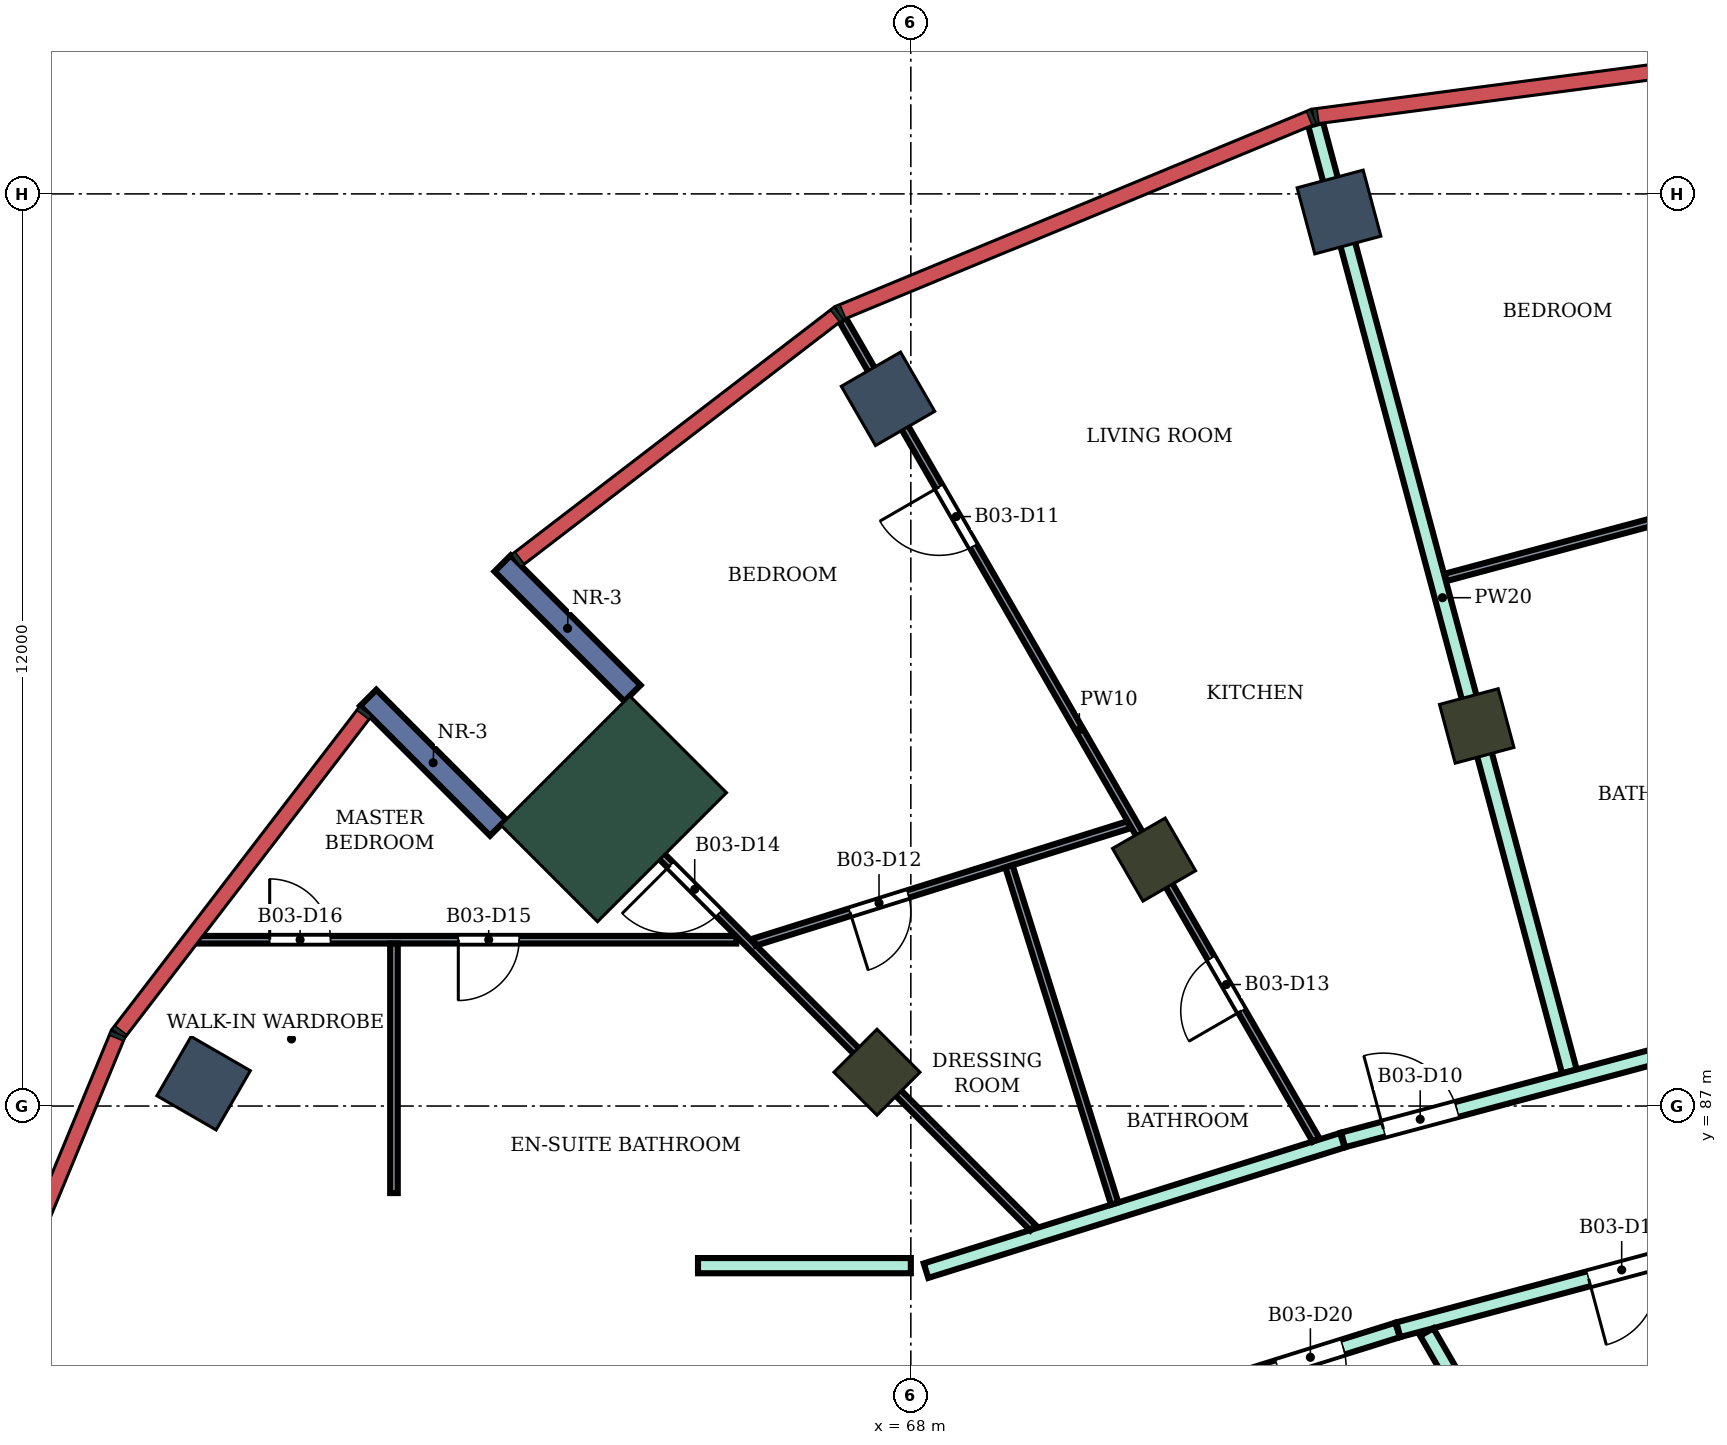
"""IFC4 building model, lengths in metres.
Left out: names, types, materials, properties, quantities, classifications, styles, units other than length and angle.
Written with IfcOpenShell. Run it as: python <this file> out.ifc"""

import sys

from ifc_helpers import new_model, si_unit, direction, frame, frame_2d, origin, origin_2d, place, context, subcontext, project, spatial, rectangle, extrude, element, fill, save


model = new_model("IFC4")
c1 = context("Model", 3, precision=1e-05, world=origin(), true_north=direction((0.0, 1.0)))
c2 = subcontext(c1, "Body", "Model", "MODEL_VIEW")
j1 = project(units=[si_unit("LENGTHUNIT", "METRE"), si_unit("PLANEANGLEUNIT", "RADIAN")], contexts=[c1])
p1 = place(None, origin())
s1 = spatial("IfcSite", under=j1, at=p1, CompositionType="ELEMENT")
p2 = place(p1, origin())
s2 = spatial("IfcBuilding", under=s1, at=p2, CompositionType="ELEMENT")
p3 = place(p2, frame((0.0, 0.0, 245.7)))
s3 = spatial("IfcBuildingStorey", under=s2, at=p3, CompositionType="ELEMENT", Elevation=245.7)
for number, where, z_axis, x_axis in (
    (1, (73.633, 98.762, 0.0), (0.0, 0.0, 1.0), (-0.259, 0.966, 0.0)),
    (2, (67.7, 96.304, 0.0), (0.0, 0.0, 1.0), (-0.5, 0.866, 0.0)),
    (3, (58.696, 87.3, 0.0), (0.0, 0.0, 1.0), (-0.866, 0.5, 0.0)),
):
    element("IfcColumn", number, at=place(p3, frame(where, z_axis=z_axis, x_axis=x_axis)), inside=s3, PredefinedType="COLUMN", context=c2, shape_type="SweptSolid", body=[
        extrude(rectangle(XDim=0.9, YDim=0.9, at=origin_2d()), origin(), (0.0, 0.0, 1.0), 4.2),
    ])
for number, where, z_axis, x_axis in (
    (4, (75.445, 92.0, 0.0), (0.0, 0.0, 1.0), (-0.259, 0.966, 0.0)),
    (5, (71.2, 90.242, 0.0), (0.0, 0.0, 1.0), (-0.5, 0.866, 0.0)),
    (6, (67.555, 87.445, 0.0), (0.0, 0.0, 1.0), (-0.707, 0.707, 0.0)),
):
    element("IfcColumn", number, at=place(p3, frame(where, z_axis=z_axis, x_axis=x_axis)), inside=s3, PredefinedType="COLUMN", context=c2, shape_type="SweptSolid", body=[
        extrude(rectangle(XDim=0.8, YDim=0.8, at=origin_2d()), origin(), (0.0, 0.0, 1.0), 4.2),
    ])
p4 = place(p3, frame((64.09, 90.91, 0.0), z_axis=(0.0, 0.0, 1.0), x_axis=(-0.707106781187, 0.707106781187, 0.0)))
e7 = element("IfcColumn", 7, at=p4, inside=s3, PredefinedType="COLUMN", context=c2, shape_type="SweptSolid", body=[
    extrude(rectangle(XDim=1.8, YDim=2.4, at=origin_2d()), origin(), (0.0, 0.0, 1.0), 4.2),
])
for number, where, z_axis, x_axis in (
    (8, (64.338, 92.43, 0.0), (0.0, 0.0, 1.0), (-0.707, 0.707, 0.0)),
    (9, (62.57, 90.662, 0.0), (0.0, 0.0, 1.0), (-0.707, 0.707, 0.0)),
):
    element("IfcWall", number, at=place(p3, frame(where, z_axis=z_axis, x_axis=x_axis)), inside=s3, PredefinedType="NOTDEFINED", context=c2, shape_type="SweptSolid", body=[
        extrude(rectangle(XDim=2.416, YDim=0.3, at=frame_2d((1.208, 0.0))), origin(), (0.0, 0.0, 1.0), 4.2),
    ])
p5 = place(p3, frame((65.2, 84.9, 0.0), z_axis=(0.0, 0.0, 1.0), x_axis=(1.0, 0.0, 0.0)))
e10 = element("IfcWall", 10, at=p5, inside=s3, PredefinedType="PARTITIONING", context=c2, shape_type="SweptSolid", body=[
    extrude(rectangle(XDim=2.8, YDim=0.2, at=frame_2d((1.4, 0.0))), origin(), (0.0, 0.0, 1.0), 3.75),
])
p6 = place(p3, frame((68.2, 84.834, 0.0), z_axis=(0.0, 0.0, 1.0), x_axis=(0.954272398161, 0.298938438661, 0.0)))
e11 = element("IfcWall", 11, at=p6, inside=s3, PredefinedType="PARTITIONING", context=c2, shape_type="SweptSolid", body=[
    extrude(rectangle(XDim=5.74, YDim=0.2, at=frame_2d((2.87, 0.0))), origin(), (0.0, 0.0, 1.0), 3.75),
])
p7 = place(p3, frame((72.1, 83.332, 0.0), z_axis=(0.0, 0.0, 1.0), x_axis=(0.954233106619, 0.299063836383, 0.0)))
e12 = element("IfcWall", 12, at=p7, inside=s3, PredefinedType="PARTITIONING", context=c2, shape_type="SweptSolid", body=[
    extrude(rectangle(XDim=2.414, YDim=0.2, at=frame_2d((1.207, 0.0))), origin(), (0.0, 0.0, 1.0), 3.75),
])
p8 = place(p7, frame((0.762, 0.0, 0.0)))
e13 = element("IfcOpeningElement", 13, at=p8, cuts=e12, PredefinedType="OPENING", context=c2, shape_type="SweptSolid", body=[
    extrude(rectangle(XDim=0.9, YDim=2.1, at=frame_2d((0.45, 1.05))), frame((0.0, 0.11, 0.0), z_axis=(0.0, -1.0, 0.0), x_axis=(1.0, 0.0, 0.0)), (0.0, 0.0, 1.0), 0.22),
])
p9 = place(p3, frame((73.325, 99.92, 0.0), z_axis=(0.0, 0.0, 1.0), x_axis=(0.258745857482, -0.965945433881, 0.0)))
e14 = element("IfcWall", 14, at=p9, inside=s3, PredefinedType="PARTITIONING", context=c2, shape_type="SweptSolid", body=[
    extrude(rectangle(XDim=12.904, YDim=0.2, at=frame_2d((6.452, 0.0))), origin(), (0.0, 0.0, 1.0), 3.75),
])
p10 = place(p3, frame((73.687, 86.554, 0.0), z_axis=(0.0, 0.0, 1.0), x_axis=(0.96595928904, 0.258694128106, 0.0)))
e15 = element("IfcWall", 15, at=p10, inside=s3, PredefinedType="PARTITIONING", context=c2, shape_type="SweptSolid", body=[
    extrude(rectangle(XDim=6.496, YDim=0.2, at=frame_2d((3.248, 0.0))), origin(), (0.0, 0.0, 1.0), 3.75),
])
p11 = place(p10, frame((0.55, 0.0, 0.0)))
e16 = element("IfcOpeningElement", 16, at=p11, cuts=e15, PredefinedType="OPENING", context=c2, shape_type="SweptSolid", body=[
    extrude(rectangle(XDim=1.0, YDim=2.1, at=frame_2d((0.5, 1.05))), frame((0.0, 0.11, 0.0), z_axis=(0.0, -1.0, 0.0), x_axis=(1.0, 0.0, 0.0)), (0.0, 0.0, 1.0), 0.22),
])
p12 = place(p3, frame((74.413, 84.057, 0.0), z_axis=(0.0, 0.0, 1.0), x_axis=(0.965972135939, 0.258646153246, 0.0)))
e17 = element("IfcWall", 17, at=p12, inside=s3, PredefinedType="PARTITIONING", context=c2, shape_type="SweptSolid", body=[
    extrude(rectangle(XDim=5.654, YDim=0.2, at=frame_2d((2.827, 0.0))), origin(), (0.0, 0.0, 1.0), 3.75),
])
p13 = place(p12, frame((2.593, 0.0, 0.0)))
e18 = element("IfcOpeningElement", 18, at=p13, cuts=e17, PredefinedType="OPENING", context=c2, shape_type="SweptSolid", body=[
    extrude(rectangle(XDim=0.9, YDim=2.1, at=frame_2d((0.45, 1.05))), frame((0.0, 0.11, 0.0), z_axis=(0.0, -1.0, 0.0), x_axis=(1.0, 0.0, 0.0)), (0.0, 0.0, 1.0), 0.22),
])
p14 = place(p3, frame((74.787, 84.027, 0.0), z_axis=(0.0, 0.0, 1.0), x_axis=(0.500079107518, -0.86597972622, 0.0)))
e19 = element("IfcWall", 19, at=p14, inside=s3, PredefinedType="PARTITIONING", context=c2, shape_type="SweptSolid", body=[
    extrude(rectangle(XDim=2.726, YDim=0.2, at=frame_2d((1.363, 0.0))), origin(), (0.0, 0.0, 1.0), 3.75),
])
p15 = place(p3, frame((58.6, 89.188, 0.0), z_axis=(0.0, 0.0, 1.0), x_axis=(1.0, 0.0, 0.0)))
e20 = element("IfcWall", 20, at=p15, inside=s3, PredefinedType="PARTITIONING", context=c2, shape_type="SweptSolid", body=[
    extrude(rectangle(XDim=7.103, YDim=0.1, at=frame_2d((3.551, 0.0))), origin(), (0.0, 0.0, 1.0), 3.75),
])
p16 = place(p15, frame((3.447, 0.0, 0.0)))
e21 = element("IfcOpeningElement", 21, at=p16, cuts=e20, PredefinedType="OPENING", context=c2, shape_type="SweptSolid", body=[
    extrude(rectangle(XDim=0.8, YDim=2.1, at=frame_2d((0.4, 1.05))), frame((0.0, 0.06, 0.0), z_axis=(0.0, -1.0, 0.0), x_axis=(1.0, 0.0, 0.0)), (0.0, 0.0, 1.0), 0.12),
])
p17 = place(p15, frame((0.965, 0.0, 0.0)))
e22 = element("IfcOpeningElement", 22, at=p17, cuts=e20, PredefinedType="OPENING", context=c2, shape_type="SweptSolid", body=[
    extrude(rectangle(XDim=0.8, YDim=2.1, at=frame_2d((0.4, 1.05))), frame((0.0, 0.06, 0.0), z_axis=(0.0, -1.0, 0.0), x_axis=(1.0, 0.0, 0.0)), (0.0, 0.0, 1.0), 0.12),
])
p18 = place(p3, frame((61.2, 85.855, 0.0), z_axis=(0.0, 0.0, 1.0), x_axis=(0.0, 1.0, 0.0)))
e23 = element("IfcWall", 23, at=p18, inside=s3, PredefinedType="PARTITIONING", context=c2, shape_type="SweptSolid", body=[
    extrude(rectangle(XDim=3.283, YDim=0.1, at=frame_2d((1.642, 0.0))), origin(), (0.0, 0.0, 1.0), 3.75),
])
p19 = place(p3, frame((63.599, 91.409, 0.0), z_axis=(0.0, 0.0, 1.0), x_axis=(0.706948776529, -0.707264750546, 0.0)))
e24 = element("IfcWall", 24, at=p19, inside=s3, PredefinedType="PARTITIONING", context=c2, shape_type="SweptSolid", body=[
    extrude(rectangle(XDim=8.499, YDim=0.1, at=frame_2d((4.25, 0.0))), origin(), (0.0, 0.0, 1.0), 3.75),
])
p20 = place(p19, frame((1.753, 0.0, 0.0)))
e25 = element("IfcOpeningElement", 25, at=p20, cuts=e24, PredefinedType="OPENING", context=c2, shape_type="SweptSolid", body=[
    extrude(rectangle(XDim=0.9, YDim=2.1, at=frame_2d((0.45, 1.05))), frame((0.0, 0.06, 0.0), z_axis=(0.0, -1.0, 0.0), x_axis=(1.0, 0.0, 0.0)), (0.0, 0.0, 1.0), 0.12),
])
p21 = place(p3, frame((65.944, 89.157, 0.0), z_axis=(0.0, 0.0, 1.0), x_axis=(0.954248987961, 0.299013158531, 0.0)))
e26 = element("IfcWall", 26, at=p21, inside=s3, PredefinedType="PARTITIONING", context=c2, shape_type="SweptSolid", body=[
    extrude(rectangle(XDim=5.159, YDim=0.1, at=frame_2d((2.58, 0.0))), origin(), (0.0, 0.0, 1.0), 3.75),
])
p22 = place(p21, frame((1.316, 0.0, 0.0)))
e27 = element("IfcOpeningElement", 27, at=p22, cuts=e26, PredefinedType="OPENING", context=c2, shape_type="SweptSolid", body=[
    extrude(rectangle(XDim=0.8, YDim=2.1, at=frame_2d((0.4, 1.05))), frame((0.0, 0.06, 0.0), z_axis=(0.0, -1.0, 0.0), x_axis=(1.0, 0.0, 0.0)), (0.0, 0.0, 1.0), 0.12),
])
p23 = place(p3, frame((67.104, 97.343, 0.0), z_axis=(0.0, 0.0, 1.0), x_axis=(0.499891560959, -0.866088002043, 0.0)))
e28 = element("IfcWall", 28, at=p23, inside=s3, PredefinedType="PARTITIONING", context=c2, shape_type="SweptSolid", body=[
    extrude(rectangle(XDim=12.456, YDim=0.1, at=frame_2d((6.228, 0.0))), origin(), (0.0, 0.0, 1.0), 3.75),
])
p24 = place(p23, frame((2.538, 0.0, 0.0)))
e29 = element("IfcOpeningElement", 29, at=p24, cuts=e28, PredefinedType="OPENING", context=c2, shape_type="SweptSolid", body=[
    extrude(rectangle(XDim=0.9, YDim=2.1, at=frame_2d((0.45, 1.05))), frame((0.0, 0.06, 0.0), z_axis=(0.0, -1.0, 0.0), x_axis=(1.0, 0.0, 0.0)), (0.0, 0.0, 1.0), 0.12),
])
p25 = place(p23, frame((9.697, 0.0, 0.0)))
e30 = element("IfcOpeningElement", 30, at=p25, cuts=e28, PredefinedType="OPENING", context=c2, shape_type="SweptSolid", body=[
    extrude(rectangle(XDim=0.8, YDim=2.1, at=frame_2d((0.4, 1.05))), frame((0.0, 0.06, 0.0), z_axis=(0.0, -1.0, 0.0), x_axis=(1.0, 0.0, 0.0)), (0.0, 0.0, 1.0), 0.12),
])
p26 = place(p3, frame((69.291, 90.153, 0.0), z_axis=(0.0, 0.0, 1.0), x_axis=(0.299165743488, -0.954201162189, 0.0)))
e31 = element("IfcWall", 31, at=p26, inside=s3, PredefinedType="PARTITIONING", context=c2, shape_type="SweptSolid", body=[
    extrude(rectangle(XDim=4.65, YDim=0.1, at=frame_2d((2.325, 0.0))), origin(), (0.0, 0.0, 1.0), 3.75),
])
p27 = place(p3, frame((75.035, 93.955, 0.0), z_axis=(0.0, 0.0, 1.0), x_axis=(0.965868648254, 0.259032342228, 0.0)))
e32 = element("IfcWall", 32, at=p27, inside=s3, PredefinedType="PARTITIONING", context=c2, shape_type="SweptSolid", body=[
    extrude(rectangle(XDim=5.08, YDim=0.1, at=frame_2d((2.54, 0.0))), origin(), (0.0, 0.0, 1.0), 3.75),
])
p28 = place(p11, origin())
e33 = element("IfcDoor", 33, at=p28, inside=s3, OperationType="SINGLE_SWING_LEFT", PredefinedType="DOOR", context=c2, shape_type="SweptSolid", body=[
    extrude(rectangle(XDim=1.0, YDim=2.1, at=frame_2d((0.5, 1.05))), frame((0.0, 0.025, 0.0), z_axis=(0.0, -1.0, 0.0), x_axis=(1.0, 0.0, 0.0)), (0.0, 0.0, 1.0), 0.05),
])
fill(e16, e33)
p29 = place(p24, frame((0.9, 0.0, 0.0), z_axis=(0.0, 0.0, 1.0), x_axis=(-1.0, 0.0, 0.0)))
e34 = element("IfcDoor", 34, at=p29, inside=s3, OperationType="SINGLE_SWING_RIGHT", PredefinedType="DOOR", context=c2, shape_type="SweptSolid", body=[
    extrude(rectangle(XDim=0.9, YDim=2.1, at=frame_2d((0.45, 1.05))), frame((0.0, 0.025, 0.0), z_axis=(0.0, -1.0, 0.0), x_axis=(1.0, 0.0, 0.0)), (0.0, 0.0, 1.0), 0.05),
])
fill(e29, e34)
p30 = place(p22, frame((0.8, 0.0, 0.0), z_axis=(0.0, 0.0, 1.0), x_axis=(-1.0, 0.0, 0.0)))
e35 = element("IfcDoor", 35, at=p30, inside=s3, OperationType="SINGLE_SWING_RIGHT", PredefinedType="DOOR", context=c2, shape_type="SweptSolid", body=[
    extrude(rectangle(XDim=0.8, YDim=2.1, at=frame_2d((0.4, 1.05))), frame((0.0, 0.025, 0.0), z_axis=(0.0, -1.0, 0.0), x_axis=(1.0, 0.0, 0.0)), (0.0, 0.0, 1.0), 0.05),
])
fill(e27, e35)
p31 = place(p25, frame((0.8, 0.0, 0.0), z_axis=(0.0, 0.0, 1.0), x_axis=(-1.0, 0.0, 0.0)))
e36 = element("IfcDoor", 36, at=p31, inside=s3, OperationType="SINGLE_SWING_LEFT", PredefinedType="DOOR", context=c2, shape_type="SweptSolid", body=[
    extrude(rectangle(XDim=0.8, YDim=2.1, at=frame_2d((0.4, 1.05))), frame((0.0, 0.025, 0.0), z_axis=(0.0, -1.0, 0.0), x_axis=(1.0, 0.0, 0.0)), (0.0, 0.0, 1.0), 0.05),
])
fill(e30, e36)
p32 = place(p20, frame((0.9, 0.0, 0.0), z_axis=(0.0, 0.0, 1.0), x_axis=(-1.0, 0.0, 0.0)))
e37 = element("IfcDoor", 37, at=p32, inside=s3, OperationType="SINGLE_SWING_RIGHT", PredefinedType="DOOR", context=c2, shape_type="SweptSolid", body=[
    extrude(rectangle(XDim=0.9, YDim=2.1, at=frame_2d((0.45, 1.05))), frame((0.0, 0.025, 0.0), z_axis=(0.0, -1.0, 0.0), x_axis=(1.0, 0.0, 0.0)), (0.0, 0.0, 1.0), 0.05),
])
fill(e25, e37)
p33 = place(p16, frame((0.8, 0.0, 0.0), z_axis=(0.0, 0.0, 1.0), x_axis=(-1.0, 0.0, 0.0)))
e38 = element("IfcDoor", 38, at=p33, inside=s3, OperationType="SINGLE_SWING_RIGHT", PredefinedType="DOOR", context=c2, shape_type="SweptSolid", body=[
    extrude(rectangle(XDim=0.8, YDim=2.1, at=frame_2d((0.4, 1.05))), frame((0.0, 0.025, 0.0), z_axis=(0.0, -1.0, 0.0), x_axis=(1.0, 0.0, 0.0)), (0.0, 0.0, 1.0), 0.05),
])
fill(e21, e38)
p34 = place(p17, origin())
e39 = element("IfcDoor", 39, at=p34, inside=s3, OperationType="SINGLE_SWING_LEFT", PredefinedType="DOOR", context=c2, shape_type="SweptSolid", body=[
    extrude(rectangle(XDim=0.8, YDim=2.1, at=frame_2d((0.4, 1.05))), frame((0.0, 0.025, 0.0), z_axis=(0.0, -1.0, 0.0), x_axis=(1.0, 0.0, 0.0)), (0.0, 0.0, 1.0), 0.05),
])
fill(e22, e39)
p35 = place(p13, frame((0.9, 0.0, 0.0), z_axis=(0.0, 0.0, 1.0), x_axis=(-1.0, 0.0, 0.0)))
e40 = element("IfcDoor", 40, at=p35, inside=s3, OperationType="SINGLE_SWING_RIGHT", PredefinedType="DOOR", context=c2, shape_type="SweptSolid", body=[
    extrude(rectangle(XDim=0.9, YDim=2.1, at=frame_2d((0.45, 1.05))), frame((0.0, 0.025, 0.0), z_axis=(0.0, -1.0, 0.0), x_axis=(1.0, 0.0, 0.0)), (0.0, 0.0, 1.0), 0.05),
])
fill(e18, e40)
p36 = place(p8, frame((0.9, 0.0, 0.0), z_axis=(0.0, 0.0, 1.0), x_axis=(-1.0, 0.0, 0.0)))
e41 = element("IfcDoor", 41, at=p36, inside=s3, OperationType="SINGLE_SWING_RIGHT", PredefinedType="DOOR", context=c2, shape_type="SweptSolid", body=[
    extrude(rectangle(XDim=0.9, YDim=2.1, at=frame_2d((0.45, 1.05))), frame((0.0, 0.025, 0.0), z_axis=(0.0, -1.0, 0.0), x_axis=(1.0, 0.0, 0.0)), (0.0, 0.0, 1.0), 0.05),
])
fill(e13, e41)
save(model, sys.argv[1])
